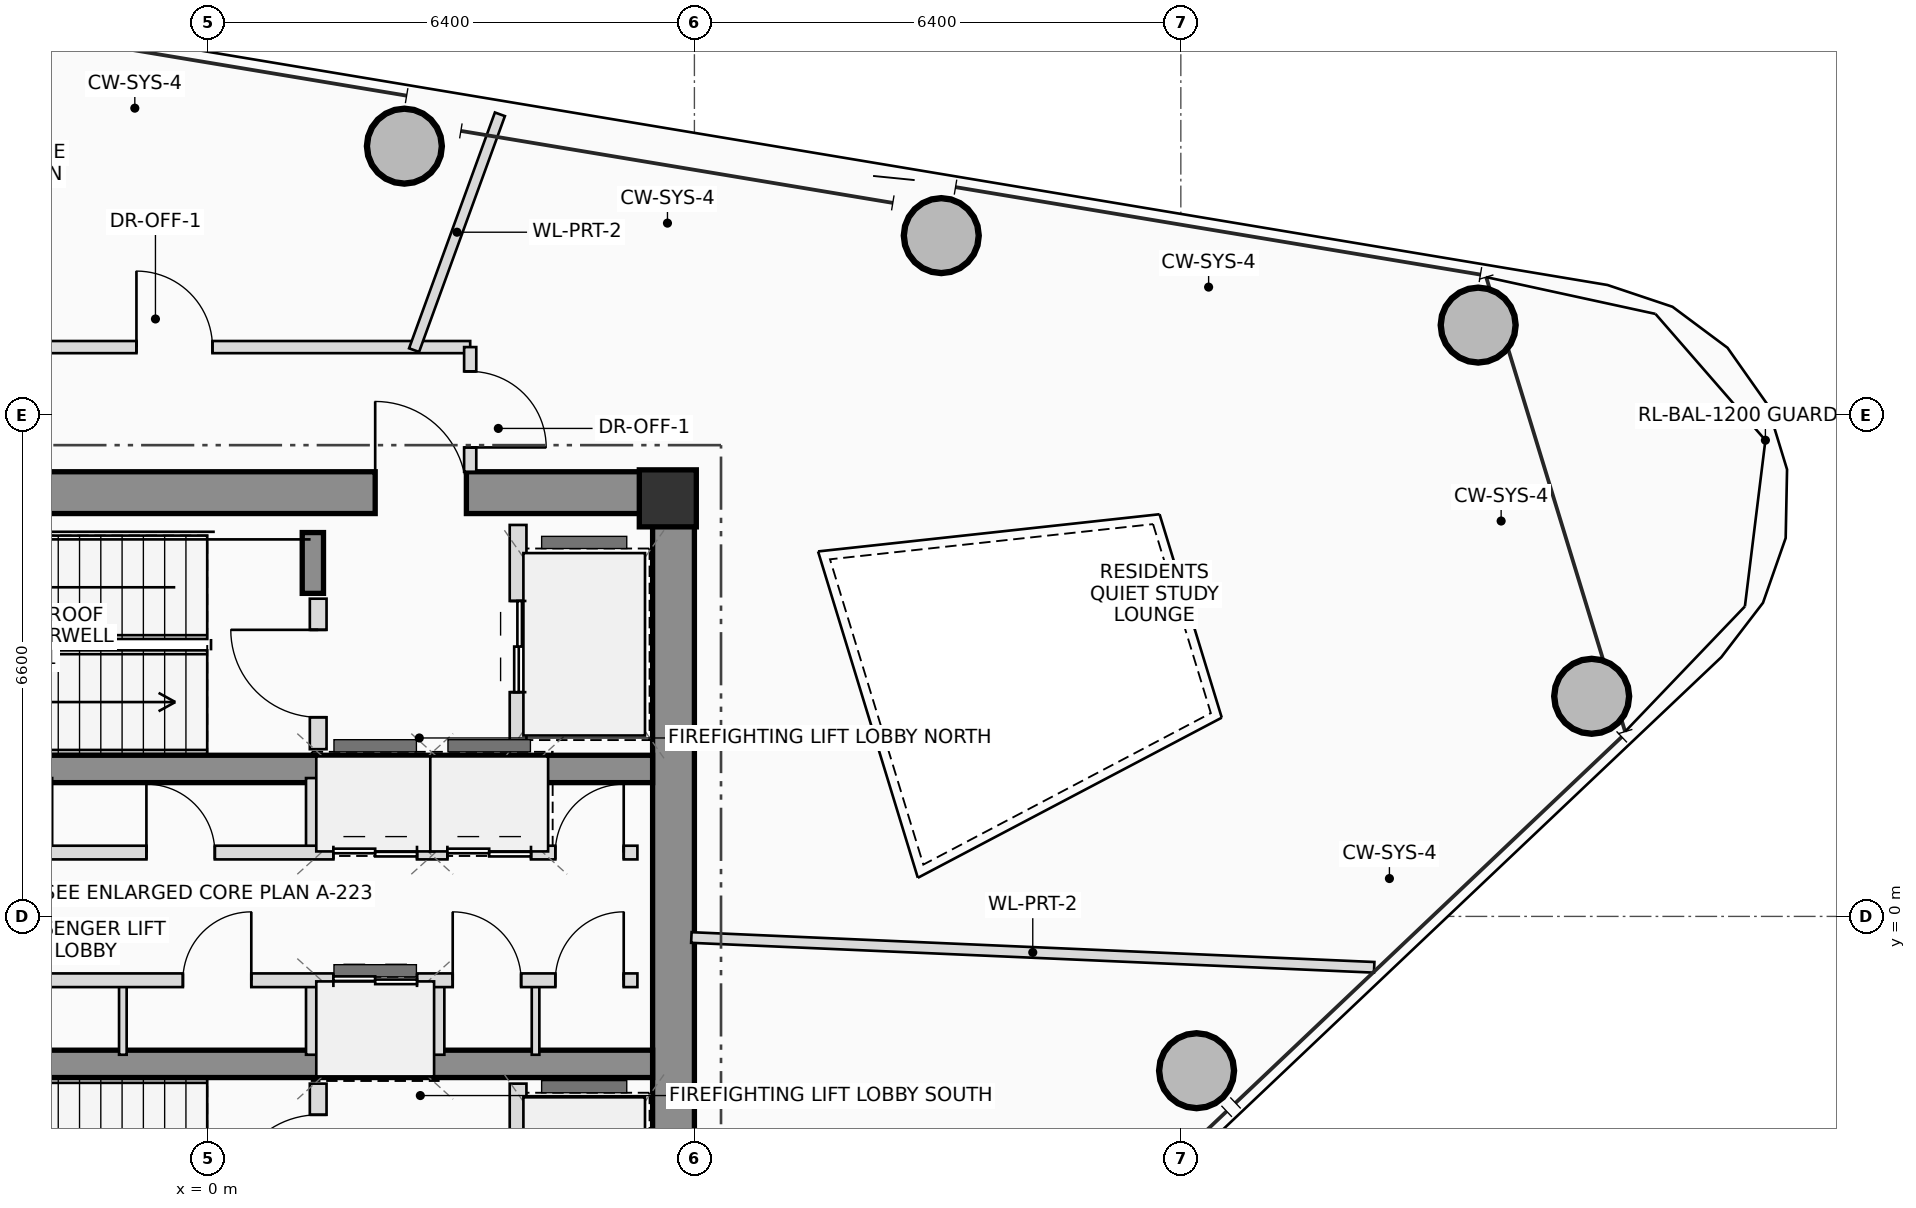
"""IFC4 building model, lengths in metres.
Left out: names, types, materials, properties, quantities, classifications, styles, units other than length and angle.
Written with IfcOpenShell. Run it as: python <this file> out.ifc"""

import sys

from ifc_helpers import new_model, si_unit, direction, frame, frame_2d, origin, origin_2d, place, context, subcontext, project, spatial, rectangle, hollow_circle, extrude, source, transform, mapped, element, fill, save


model = new_model("IFC4")
c1 = context("Model", 3, precision=1e-05, world=origin(), true_north=direction((0.0, 1.0)))
c2 = subcontext(c1, "Body", "Model", "MODEL_VIEW")
j1 = project(units=[si_unit("LENGTHUNIT", "METRE"), si_unit("PLANEANGLEUNIT", "RADIAN")], contexts=[c1])
p1 = place(None, origin())
s1 = spatial("IfcSite", under=j1, at=p1, CompositionType="ELEMENT")
p2 = place(p1, origin())
s2 = spatial("IfcBuilding", under=s1, at=p2, CompositionType="ELEMENT")
p3 = place(p2, frame((0.0, 0.0, 249.05)))
s3 = spatial("IfcBuildingStorey", under=s2, at=p3, CompositionType="ELEMENT", Elevation=249.05)
m1 = source(origin(), c2, "Body", "SweptSolid", [
    extrude(rectangle(XDim=0.75, YDim=0.75, at=origin_2d()), origin(), (0.0, 0.0, 1.0), 3.4),
])
p4 = place(p3, frame((6.05, 5.5, 0.0), z_axis=(0.0, 0.0, 1.0), x_axis=(1.0, 0.0, 0.0)))
e1 = element("IfcColumn", 1, at=p4, inside=s3, PredefinedType="COLUMN", context=c2, shape_type="MappedRepresentation", body=[
    mapped(m1, transform((0.0, 0.0, 0.0), scale=1.0)),
])
p5 = place(p3, frame((-6.4, 5.575, 0.0), z_axis=(0.0, 0.0, 1.0), x_axis=(1.0, 0.0, 0.0)))
e2 = element("IfcWall", 2, at=p5, inside=s3, PredefinedType="SHEAR", context=c2, shape_type="SweptSolid", body=[
    extrude(rectangle(XDim=12.8, YDim=0.55, at=frame_2d((6.4, 0.0))), origin(), (0.0, 0.0, 1.0), 3.4),
])
p6 = place(p5, frame((8.6, 0.0, 0.0)))
e3 = element("IfcOpeningElement", 3, at=p6, cuts=e2, PredefinedType="OPENING", context=c2, shape_type="SweptSolid", body=[
    extrude(rectangle(XDim=1.2, YDim=2.2, at=frame_2d((0.6, 1.1))), frame((0.0, 0.285, 0.0), z_axis=(0.0, -1.0, 0.0), x_axis=(1.0, 0.0, 0.0)), (0.0, 0.0, 1.0), 0.57),
])
p7 = place(p3, frame((6.125, -5.3, 0.0), z_axis=(0.0, 0.0, 1.0), x_axis=(0.0, 1.0, 0.0)))
e4 = element("IfcWall", 4, at=p7, inside=s3, PredefinedType="SHEAR", context=c2, shape_type="SweptSolid", body=[
    extrude(rectangle(XDim=10.6, YDim=0.55, at=frame_2d((5.3, 0.0))), origin(), (0.0, 0.0, 1.0), 3.4),
])
for number, where, z_axis, x_axis in (
    (5, (-5.85, 1.94, 0.0), (0.0, 0.0, 1.0), (1.0, 0.0, 0.0)),
    (6, (-5.85, -1.94, 0.0), (0.0, 0.0, 1.0), (1.0, 0.0, 0.0)),
):
    element("IfcWall", number, at=place(p3, frame(where, z_axis=z_axis, x_axis=x_axis)), inside=s3, PredefinedType="SHEAR", context=c2, shape_type="SweptSolid", body=[
        extrude(rectangle(XDim=11.7, YDim=0.36, at=frame_2d((5.85, 0.0))), origin(), (0.0, 0.0, 1.0), 3.4),
    ])
p8 = place(p3, frame((1.38, 4.25, 0.0), z_axis=(0.0, 0.0, 1.0), x_axis=(0.0, 1.0, 0.0)))
e7 = element("IfcWall", 7, at=p8, inside=s3, PredefinedType="SHEAR", context=c2, shape_type="SweptSolid", body=[
    extrude(rectangle(XDim=0.8, YDim=0.28, at=frame_2d((0.4, 0.0))), origin(), (0.0, 0.0, 1.0), 3.4),
])
m2 = source(origin(), c2, "Body", "SweptSolid", [
    extrude(hollow_circle(Radius=0.5, WallThickness=0.04, at=origin_2d()), origin(), (0.0, 0.0, 1.0), 3.4),
])
for number, where, z_axis, x_axis in (
    (8, (13.007, -2.03, 0.0), (0.0, 0.0, 1.0), (1.0, 0.0, 0.0)),
    (9, (18.205, 2.896, 0.0), (0.0, 0.0, 1.0), (1.0, 0.0, 0.0)),
    (10, (16.712, 7.779, 0.0), (0.0, 0.0, 1.0), (1.0, 0.0, 0.0)),
    (11, (9.648, 8.957, 0.0), (0.0, 0.0, 1.0), (1.0, 0.0, 0.0)),
    (12, (2.584, 10.134, 0.0), (0.0, 0.0, 1.0), (1.0, 0.0, 0.0)),
):
    element("IfcColumn", number, at=place(p3, frame(where, z_axis=z_axis, x_axis=x_axis)), inside=s3, PredefinedType="COLUMN", context=c2, shape_type="MappedRepresentation", body=[
        mapped(m2, transform((0.0, 0.0, 0.0), scale=1.0)),
    ])
p9 = place(p3, frame((1.45, 2.2, 0.0), z_axis=(0.0, 0.0, 1.0), x_axis=(0.0, 1.0, 0.0)))
e13 = element("IfcWall", 13, at=p9, inside=s3, PredefinedType="PLUMBINGWALL", context=c2, shape_type="SweptSolid", body=[
    extrude(rectangle(XDim=1.98, YDim=0.22, at=frame_2d((0.99, 0.0))), origin(), (0.0, 0.0, 1.0), 3.16),
])
p10 = place(p9, frame((0.42, 0.0, 0.0)))
e14 = element("IfcOpeningElement", 14, at=p10, cuts=e13, PredefinedType="OPENING", context=c2, shape_type="SweptSolid", body=[
    extrude(rectangle(XDim=1.15, YDim=2.15, at=frame_2d((0.575, 1.075))), frame((0.0, 0.12, 0.0), z_axis=(0.0, -1.0, 0.0), x_axis=(1.0, 0.0, 0.0)), (0.0, 0.0, 1.0), 0.24),
])
p11 = place(p3, frame((4.08, 2.2, 0.0), z_axis=(0.0, 0.0, 1.0), x_axis=(0.0, 1.0, 0.0)))
e15 = element("IfcWall", 15, at=p11, inside=s3, PredefinedType="PLUMBINGWALL", context=c2, shape_type="SweptSolid", body=[
    extrude(rectangle(XDim=2.95, YDim=0.22, at=frame_2d((1.475, 0.0))), origin(), (0.0, 0.0, 1.0), 3.16),
])
p12 = place(p11, frame((0.75, 0.0, 0.0)))
e16 = element("IfcOpeningElement", 16, at=p12, cuts=e15, PredefinedType="OPENING", context=c2, shape_type="SweptSolid", body=[
    extrude(rectangle(XDim=1.2, YDim=2.25, at=frame_2d((0.6, 1.125))), frame((0.0, 0.12, 0.0), z_axis=(0.0, -1.0, 0.0), x_axis=(1.0, 0.0, 0.0)), (0.0, 0.0, 1.0), 0.24),
])
p13 = place(p3, frame((1.45, -4.18, 0.0), z_axis=(0.0, 0.0, 1.0), x_axis=(0.0, 1.0, 0.0)))
e17 = element("IfcWall", 17, at=p13, inside=s3, PredefinedType="PLUMBINGWALL", context=c2, shape_type="SweptSolid", body=[
    extrude(rectangle(XDim=1.98, YDim=0.22, at=frame_2d((0.99, 0.0))), origin(), (0.0, 0.0, 1.0), 3.16),
])
p14 = place(p13, frame((0.42, 0.0, 0.0)))
e18 = element("IfcOpeningElement", 18, at=p14, cuts=e17, PredefinedType="OPENING", context=c2, shape_type="SweptSolid", body=[
    extrude(rectangle(XDim=1.15, YDim=2.15, at=frame_2d((0.575, 1.075))), frame((0.0, 0.12, 0.0), z_axis=(0.0, -1.0, 0.0), x_axis=(1.0, 0.0, 0.0)), (0.0, 0.0, 1.0), 0.24),
])
p15 = place(p3, frame((4.08, -5.15, 0.0), z_axis=(0.0, 0.0, 1.0), x_axis=(0.0, 1.0, 0.0)))
e19 = element("IfcWall", 19, at=p15, inside=s3, PredefinedType="PLUMBINGWALL", context=c2, shape_type="SweptSolid", body=[
    extrude(rectangle(XDim=2.95, YDim=0.22, at=frame_2d((1.475, 0.0))), origin(), (0.0, 0.0, 1.0), 3.16),
])
p16 = place(p15, frame((0.95, 0.0, 0.0)))
e20 = element("IfcOpeningElement", 20, at=p16, cuts=e19, PredefinedType="OPENING", context=c2, shape_type="SweptSolid", body=[
    extrude(rectangle(XDim=1.2, YDim=2.25, at=frame_2d((0.6, 1.125))), frame((0.0, 0.12, 0.0), z_axis=(0.0, -1.0, 0.0), x_axis=(1.0, 0.0, 0.0)), (0.0, 0.0, 1.0), 0.24),
])
p17 = place(p3, frame((-1.12, -1.82, 0.0), z_axis=(0.0, 0.0, 1.0), x_axis=(0.0, 1.0, 0.0)))
e21 = element("IfcWall", 21, at=p17, inside=s3, PredefinedType="PARTITIONING", context=c2, shape_type="SweptSolid", body=[
    extrude(rectangle(XDim=0.98, YDim=0.1, at=frame_2d((0.49, 0.0))), origin(), (0.0, 0.0, 1.0), 3.16),
])
for number, where, z_axis, x_axis in (
    (22, (1.38, 0.84, 0.0), (0.0, 0.0, 1.0), (0.0, 1.0, 0.0)),
    (23, (1.38, -1.82, 0.0), (0.0, 0.0, 1.0), (0.0, 1.0, 0.0)),
    (24, (3.02, 0.84, 0.0), (0.0, 0.0, 1.0), (0.0, 1.0, 0.0)),
    (25, (4.38, 0.84, 0.0), (0.0, 0.0, 1.0), (0.0, 1.0, 0.0)),
    (26, (3.02, -1.82, 0.0), (0.0, 0.0, 1.0), (0.0, 1.0, 0.0)),
):
    element("IfcWall", number, at=place(p3, frame(where, z_axis=z_axis, x_axis=x_axis)), inside=s3, PredefinedType="PLUMBINGWALL", context=c2, shape_type="SweptSolid", body=[
        extrude(rectangle(XDim=0.98, YDim=0.18, at=frame_2d((0.49, 0.0))), origin(), (0.0, 0.0, 1.0), 3.16),
    ])
p18 = place(p3, frame((4.31, -1.82, 0.0), z_axis=(0.0, 0.0, 1.0), x_axis=(0.0, 1.0, 0.0)))
e27 = element("IfcWall", 27, at=p18, inside=s3, PredefinedType="PARTITIONING", context=c2, shape_type="SweptSolid", body=[
    extrude(rectangle(XDim=0.98, YDim=0.1, at=frame_2d((0.49, 0.0))), origin(), (0.0, 0.0, 1.0), 3.16),
])
p19 = place(p3, frame((-5.68, 0.84, 0.0), z_axis=(0.0, 0.0, 1.0), x_axis=(1.0, 0.0, 0.0)))
e28 = element("IfcWall", 28, at=p19, inside=s3, PredefinedType="PLUMBINGWALL", context=c2, shape_type="SweptSolid", body=[
    extrude(rectangle(XDim=11.33, YDim=0.18, at=frame_2d((5.665, 0.0))), origin(), (0.0, 0.0, 1.0), 3.16),
])
p20 = place(p19, frame((1.39, 0.0, 0.0)))
e29 = element("IfcOpeningElement", 29, at=p20, cuts=e28, PredefinedType="OPENING", context=c2, shape_type="SweptSolid", body=[
    extrude(rectangle(XDim=0.92, YDim=2.1, at=frame_2d((0.46, 1.05))), frame((0.0, 0.1, 0.0), z_axis=(0.0, -1.0, 0.0), x_axis=(1.0, 0.0, 0.0)), (0.0, 0.0, 1.0), 0.2),
])
p21 = place(p19, frame((4.87, 0.0, 0.0)))
e30 = element("IfcOpeningElement", 30, at=p21, cuts=e28, PredefinedType="OPENING", context=c2, shape_type="SweptSolid", body=[
    extrude(rectangle(XDim=0.9, YDim=2.05, at=frame_2d((0.45, 1.025))), frame((0.0, 0.1, 0.0), z_axis=(0.0, -1.0, 0.0), x_axis=(1.0, 0.0, 0.0)), (0.0, 0.0, 1.0), 0.2),
])
p22 = place(p19, frame((7.33, 0.0, 0.0)))
e31 = element("IfcOpeningElement", 31, at=p22, cuts=e28, PredefinedType="OPENING", context=c2, shape_type="SweptSolid", body=[
    extrude(rectangle(XDim=1.1, YDim=2.2, at=frame_2d((0.55, 1.1))), frame((0.0, 0.1, 0.0), z_axis=(0.0, -1.0, 0.0), x_axis=(1.0, 0.0, 0.0)), (0.0, 0.0, 1.0), 0.2),
])
p23 = place(p19, frame((8.83, 0.0, 0.0)))
e32 = element("IfcOpeningElement", 32, at=p23, cuts=e28, PredefinedType="OPENING", context=c2, shape_type="SweptSolid", body=[
    extrude(rectangle(XDim=1.1, YDim=2.2, at=frame_2d((0.55, 1.1))), frame((0.0, 0.1, 0.0), z_axis=(0.0, -1.0, 0.0), x_axis=(1.0, 0.0, 0.0)), (0.0, 0.0, 1.0), 0.2),
])
p24 = place(p19, frame((10.25, 0.0, 0.0)))
e33 = element("IfcOpeningElement", 33, at=p24, cuts=e28, PredefinedType="OPENING", context=c2, shape_type="SweptSolid", body=[
    extrude(rectangle(XDim=0.9, YDim=2.05, at=frame_2d((0.45, 1.025))), frame((0.0, 0.1, 0.0), z_axis=(0.0, -1.0, 0.0), x_axis=(1.0, 0.0, 0.0)), (0.0, 0.0, 1.0), 0.2),
])
p25 = place(p3, frame((-5.68, -0.84, 0.0), z_axis=(0.0, 0.0, 1.0), x_axis=(1.0, 0.0, 0.0)))
e34 = element("IfcWall", 34, at=p25, inside=s3, PredefinedType="PLUMBINGWALL", context=c2, shape_type="SweptSolid", body=[
    extrude(rectangle(XDim=11.33, YDim=0.18, at=frame_2d((5.665, 0.0))), origin(), (0.0, 0.0, 1.0), 3.16),
])
p26 = place(p25, frame((1.88, 0.0, 0.0)))
e35 = element("IfcOpeningElement", 35, at=p26, cuts=e34, PredefinedType="OPENING", context=c2, shape_type="SweptSolid", body=[
    extrude(rectangle(XDim=0.9, YDim=2.05, at=frame_2d((0.45, 1.025))), frame((0.0, 0.1, 0.0), z_axis=(0.0, -1.0, 0.0), x_axis=(1.0, 0.0, 0.0)), (0.0, 0.0, 1.0), 0.2),
])
p27 = place(p25, frame((5.35, 0.0, 0.0)))
e36 = element("IfcOpeningElement", 36, at=p27, cuts=e34, PredefinedType="OPENING", context=c2, shape_type="SweptSolid", body=[
    extrude(rectangle(XDim=0.9, YDim=2.05, at=frame_2d((0.45, 1.025))), frame((0.0, 0.1, 0.0), z_axis=(0.0, -1.0, 0.0), x_axis=(1.0, 0.0, 0.0)), (0.0, 0.0, 1.0), 0.2),
])
p28 = place(p25, frame((7.33, 0.0, 0.0)))
e37 = element("IfcOpeningElement", 37, at=p28, cuts=e34, PredefinedType="OPENING", context=c2, shape_type="SweptSolid", body=[
    extrude(rectangle(XDim=1.1, YDim=2.2, at=frame_2d((0.55, 1.1))), frame((0.0, 0.1, 0.0), z_axis=(0.0, -1.0, 0.0), x_axis=(1.0, 0.0, 0.0)), (0.0, 0.0, 1.0), 0.2),
])
p29 = place(p25, frame((8.9, 0.0, 0.0)))
e38 = element("IfcOpeningElement", 38, at=p29, cuts=e34, PredefinedType="OPENING", context=c2, shape_type="SweptSolid", body=[
    extrude(rectangle(XDim=0.9, YDim=2.05, at=frame_2d((0.45, 1.025))), frame((0.0, 0.1, 0.0), z_axis=(0.0, -1.0, 0.0), x_axis=(1.0, 0.0, 0.0)), (0.0, 0.0, 1.0), 0.2),
])
p30 = place(p25, frame((10.25, 0.0, 0.0)))
e39 = element("IfcOpeningElement", 39, at=p30, cuts=e34, PredefinedType="OPENING", context=c2, shape_type="SweptSolid", body=[
    extrude(rectangle(XDim=0.9, YDim=2.05, at=frame_2d((0.45, 1.025))), frame((0.0, 0.1, 0.0), z_axis=(0.0, -1.0, 0.0), x_axis=(1.0, 0.0, 0.0)), (0.0, 0.0, 1.0), 0.2),
])
p31 = place(p3, frame((-6.36, 7.49, 0.0), z_axis=(0.0, 0.0, 1.0), x_axis=(1.0, 0.0, 0.0)))
e40 = element("IfcWall", 40, at=p31, inside=s3, PredefinedType="PARTITIONING", context=c2, shape_type="SweptSolid", body=[
    extrude(rectangle(XDim=9.81, YDim=0.16, at=frame_2d((4.905, 0.0))), origin(), (0.0, 0.0, 1.0), 2.565),
])
p32 = place(p31, frame((5.419, 0.0, 0.0)))
e41 = element("IfcOpeningElement", 41, at=p32, cuts=e40, PredefinedType="OPENING", context=c2, shape_type="SweptSolid", body=[
    extrude(rectangle(XDim=1.0, YDim=2.25, at=frame_2d((0.5, 1.125))), frame((0.0, 0.09, 0.0), z_axis=(0.0, -1.0, 0.0), x_axis=(1.0, 0.0, 0.0)), (0.0, 0.0, 1.0), 0.18),
])
p33 = place(p3, frame((3.45, 7.49, 0.0), z_axis=(0.0, 0.0, 1.0), x_axis=(0.0, -1.0, 0.0)))
e42 = element("IfcWall", 42, at=p33, inside=s3, PredefinedType="PARTITIONING", context=c2, shape_type="SweptSolid", body=[
    extrude(rectangle(XDim=1.64, YDim=0.16, at=frame_2d((0.82, 0.0))), origin(), (0.0, 0.0, 1.0), 3.16),
])
p34 = place(p33, frame((0.32, 0.0, 0.0)))
e43 = element("IfcOpeningElement", 43, at=p34, cuts=e42, PredefinedType="OPENING", context=c2, shape_type="SweptSolid", body=[
    extrude(rectangle(XDim=1.0, YDim=2.25, at=frame_2d((0.5, 1.125))), frame((0.0, 0.09, 0.0), z_axis=(0.0, -1.0, 0.0), x_axis=(1.0, 0.0, 0.0)), (0.0, 0.0, 1.0), 0.18),
])
p35 = place(p3, frame((6.36, -0.278, 0.0), z_axis=(0.0, 0.0, 1.0), x_axis=(0.99904773846, -0.043630451279, 0.0)))
e44 = element("IfcWall", 44, at=p35, inside=s3, PredefinedType="PARTITIONING", context=c2, shape_type="SweptSolid", body=[
    extrude(rectangle(XDim=8.992, YDim=0.14, at=frame_2d((4.496, 0.0))), origin(), (0.0, 0.0, 1.0), 2.725),
])
p36 = place(p3, frame((2.712, 7.45, 0.0), z_axis=(0.0, 0.0, 1.0), x_axis=(0.341974588874, 0.9397092, 0.0)))
e45 = element("IfcWall", 45, at=p36, inside=s3, PredefinedType="PARTITIONING", context=c2, shape_type="SweptSolid", body=[
    extrude(rectangle(XDim=3.302, YDim=0.14, at=frame_2d((1.651, 0.0))), origin(), (0.0, 0.0, 1.0), 2.565),
])
p37 = place(p6, origin())
e46 = element("IfcDoor", 46, at=p37, inside=s3, OperationType="SINGLE_SWING_LEFT", PredefinedType="DOOR", context=c2, shape_type="SweptSolid", body=[
    extrude(rectangle(XDim=1.2, YDim=2.2, at=frame_2d((0.6, 1.1))), frame((0.0, 0.025, 0.0), z_axis=(0.0, -1.0, 0.0), x_axis=(1.0, 0.0, 0.0)), (0.0, 0.0, 1.0), 0.05),
])
fill(e3, e46)
p38 = place(p10, origin())
e47 = element("IfcDoor", 47, at=p38, inside=s3, OperationType="SINGLE_SWING_RIGHT", PredefinedType="DOOR", context=c2, shape_type="SweptSolid", body=[
    extrude(rectangle(XDim=1.15, YDim=2.15, at=frame_2d((0.575, 1.075))), frame((0.0, 0.025, 0.0), z_axis=(0.0, -1.0, 0.0), x_axis=(1.0, 0.0, 0.0)), (0.0, 0.0, 1.0), 0.05),
])
fill(e14, e47)
p39 = place(p12, origin())
e48 = element("IfcDoor", 48, at=p39, inside=s3, OperationType="DOUBLE_DOOR_SLIDING", PredefinedType="DOOR", context=c2, shape_type="SweptSolid", body=[
    extrude(rectangle(XDim=1.2, YDim=2.25, at=frame_2d((0.6, 1.125))), frame((0.0, 0.025, 0.0), z_axis=(0.0, -1.0, 0.0), x_axis=(1.0, 0.0, 0.0)), (0.0, 0.0, 1.0), 0.05),
])
fill(e16, e48)
p40 = place(p14, origin())
e49 = element("IfcDoor", 49, at=p40, inside=s3, OperationType="SINGLE_SWING_LEFT", PredefinedType="DOOR", context=c2, shape_type="SweptSolid", body=[
    extrude(rectangle(XDim=1.15, YDim=2.15, at=frame_2d((0.575, 1.075))), frame((0.0, 0.025, 0.0), z_axis=(0.0, -1.0, 0.0), x_axis=(1.0, 0.0, 0.0)), (0.0, 0.0, 1.0), 0.05),
])
fill(e18, e49)
p41 = place(p21, origin())
e50 = element("IfcDoor", 50, at=p41, inside=s3, OperationType="SINGLE_SWING_LEFT", PredefinedType="DOOR", context=c2, shape_type="SweptSolid", body=[
    extrude(rectangle(XDim=0.9, YDim=2.05, at=frame_2d((0.45, 1.025))), frame((0.0, 0.025, 0.0), z_axis=(0.0, -1.0, 0.0), x_axis=(1.0, 0.0, 0.0)), (0.0, 0.0, 1.0), 0.05),
])
fill(e30, e50)
p42 = place(p22, origin())
e51 = element("IfcDoor", 51, at=p42, inside=s3, OperationType="DOUBLE_DOOR_SLIDING", PredefinedType="DOOR", context=c2, shape_type="SweptSolid", body=[
    extrude(rectangle(XDim=1.1, YDim=2.2, at=frame_2d((0.55, 1.1))), frame((0.0, 0.025, 0.0), z_axis=(0.0, -1.0, 0.0), x_axis=(1.0, 0.0, 0.0)), (0.0, 0.0, 1.0), 0.05),
])
fill(e31, e51)
p43 = place(p23, origin())
e52 = element("IfcDoor", 52, at=p43, inside=s3, OperationType="DOUBLE_DOOR_SLIDING", PredefinedType="DOOR", context=c2, shape_type="SweptSolid", body=[
    extrude(rectangle(XDim=1.1, YDim=2.2, at=frame_2d((0.55, 1.1))), frame((0.0, 0.025, 0.0), z_axis=(0.0, -1.0, 0.0), x_axis=(1.0, 0.0, 0.0)), (0.0, 0.0, 1.0), 0.05),
])
fill(e32, e52)
p44 = place(p24, origin())
e53 = element("IfcDoor", 53, at=p44, inside=s3, OperationType="SINGLE_SWING_RIGHT", PredefinedType="DOOR", context=c2, shape_type="SweptSolid", body=[
    extrude(rectangle(XDim=0.9, YDim=2.05, at=frame_2d((0.45, 1.025))), frame((0.0, 0.025, 0.0), z_axis=(0.0, -1.0, 0.0), x_axis=(1.0, 0.0, 0.0)), (0.0, 0.0, 1.0), 0.05),
])
fill(e33, e53)
p45 = place(p27, origin())
e54 = element("IfcDoor", 54, at=p45, inside=s3, OperationType="SINGLE_SWING_RIGHT", PredefinedType="DOOR", context=c2, shape_type="SweptSolid", body=[
    extrude(rectangle(XDim=0.9, YDim=2.05, at=frame_2d((0.45, 1.025))), frame((0.0, 0.025, 0.0), z_axis=(0.0, -1.0, 0.0), x_axis=(1.0, 0.0, 0.0)), (0.0, 0.0, 1.0), 0.05),
])
fill(e36, e54)
p46 = place(p28, origin())
e55 = element("IfcDoor", 55, at=p46, inside=s3, OperationType="DOUBLE_DOOR_SLIDING", PredefinedType="DOOR", context=c2, shape_type="SweptSolid", body=[
    extrude(rectangle(XDim=1.1, YDim=2.2, at=frame_2d((0.55, 1.1))), frame((0.0, 0.025, 0.0), z_axis=(0.0, -1.0, 0.0), x_axis=(1.0, 0.0, 0.0)), (0.0, 0.0, 1.0), 0.05),
])
fill(e37, e55)
p47 = place(p29, origin())
e56 = element("IfcDoor", 56, at=p47, inside=s3, OperationType="SINGLE_SWING_LEFT", PredefinedType="DOOR", context=c2, shape_type="SweptSolid", body=[
    extrude(rectangle(XDim=0.9, YDim=2.05, at=frame_2d((0.45, 1.025))), frame((0.0, 0.025, 0.0), z_axis=(0.0, -1.0, 0.0), x_axis=(1.0, 0.0, 0.0)), (0.0, 0.0, 1.0), 0.05),
])
fill(e38, e56)
p48 = place(p30, origin())
e57 = element("IfcDoor", 57, at=p48, inside=s3, OperationType="SINGLE_SWING_RIGHT", PredefinedType="DOOR", context=c2, shape_type="SweptSolid", body=[
    extrude(rectangle(XDim=0.9, YDim=2.05, at=frame_2d((0.45, 1.025))), frame((0.0, 0.025, 0.0), z_axis=(0.0, -1.0, 0.0), x_axis=(1.0, 0.0, 0.0)), (0.0, 0.0, 1.0), 0.05),
])
fill(e39, e57)
p49 = place(p32, origin())
e58 = element("IfcDoor", 58, at=p49, inside=s3, OperationType="SINGLE_SWING_LEFT", PredefinedType="DOOR", context=c2, shape_type="SweptSolid", body=[
    extrude(rectangle(XDim=1.0, YDim=2.25, at=frame_2d((0.5, 1.125))), frame((0.0, 0.025, 0.0), z_axis=(0.0, -1.0, 0.0), x_axis=(1.0, 0.0, 0.0)), (0.0, 0.0, 1.0), 0.05),
])
fill(e41, e58)
p50 = place(p34, origin())
e59 = element("IfcDoor", 59, at=p50, inside=s3, OperationType="SINGLE_SWING_RIGHT", PredefinedType="DOOR", context=c2, shape_type="SweptSolid", body=[
    extrude(rectangle(XDim=1.0, YDim=2.25, at=frame_2d((0.5, 1.125))), frame((0.0, 0.025, 0.0), z_axis=(0.0, -1.0, 0.0), x_axis=(1.0, 0.0, 0.0)), (0.0, 0.0, 1.0), 0.05),
])
fill(e43, e59)
save(model, sys.argv[1])
